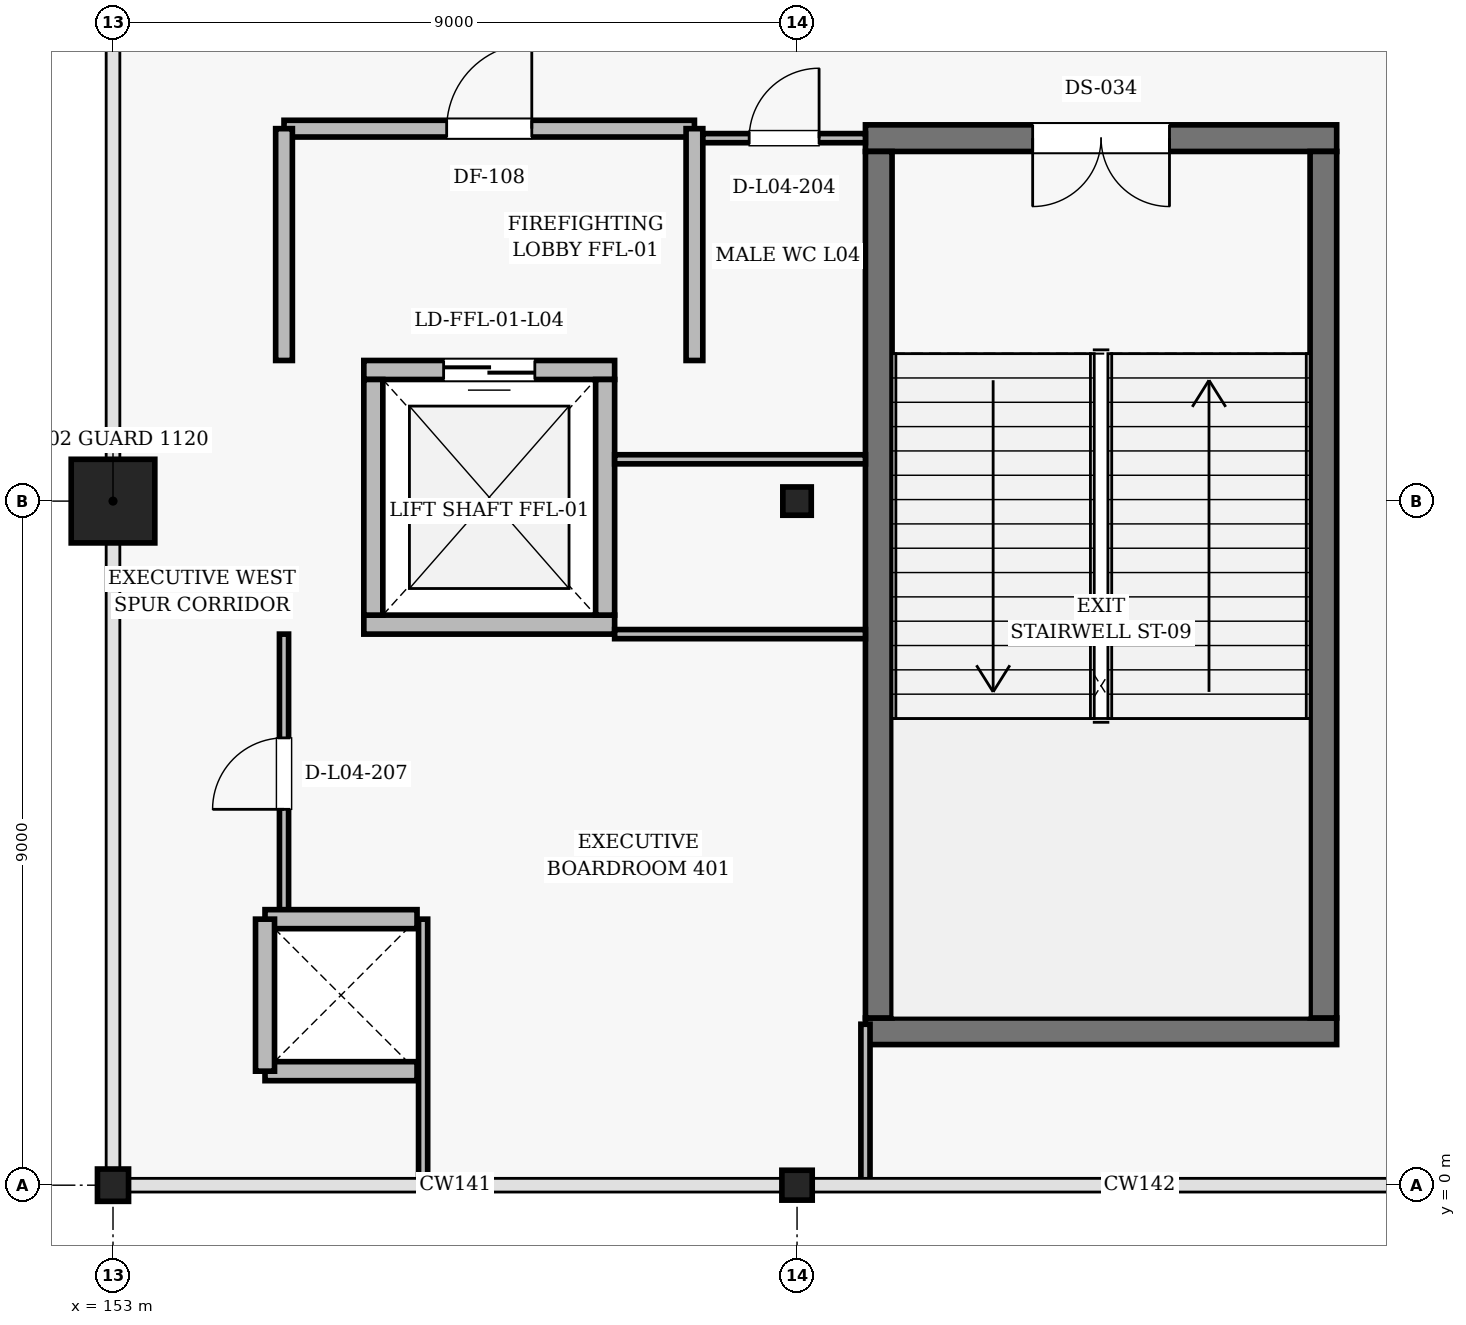
"""IFC4 building model, lengths in metres.
Left out: names, types, materials, properties, quantities, classifications, styles, units other than length and angle.
Written with IfcOpenShell. Run it as: python <this file> out.ifc"""

import sys

from ifc_helpers import new_model, si_unit, direction, frame, frame_2d, origin, origin_2d, place, context, subcontext, project, spatial, rectangle, i_section, extrude, element, fill, save


model = new_model("IFC4")
c1 = context("Model", 3, precision=1e-05, world=origin(), true_north=direction((0.0, 1.0)))
c2 = subcontext(c1, "Body", "Model", "MODEL_VIEW")
j1 = project(units=[si_unit("LENGTHUNIT", "METRE"), si_unit("PLANEANGLEUNIT", "RADIAN")], contexts=[c1])
p1 = place(None, origin())
s1 = spatial("IfcSite", under=j1, at=p1, CompositionType="ELEMENT")
p2 = place(p1, origin())
s2 = spatial("IfcBuilding", under=s1, at=p2, CompositionType="ELEMENT")
p3 = place(p2, frame((0.0, 0.0, 20.4)))
s3 = spatial("IfcBuildingStorey", under=s2, at=p3, CompositionType="ELEMENT", Elevation=20.4)
p4 = place(p3, frame((153.0, 0.0, 0.0), z_axis=(0.0, 0.0, 1.0), x_axis=(1.0, 0.0, 0.0)))
e1 = element("IfcColumn", 1, at=p4, inside=s3, PredefinedType="COLUMN", context=c2, shape_type="SweptSolid", body=[
    extrude(i_section(OverallWidth=0.409, OverallDepth=0.425, WebThickness=0.031, FlangeThickness=0.049, FilletRadius=0.02, at=origin_2d()), origin(), (0.0, 0.0, 1.0), 4.8),
])
p5 = place(p3, frame((153.0, 9.0, 0.0), z_axis=(0.0, 0.0, 1.0), x_axis=(1.0, 0.0, 0.0)))
e2 = element("IfcColumn", 2, at=p5, inside=s3, PredefinedType="COLUMN", context=c2, shape_type="SweptSolid", body=[
    extrude(rectangle(XDim=1.1, YDim=1.1, at=origin_2d()), origin(), (0.0, 0.0, 1.0), 4.8),
])
p6 = place(p3, frame((162.0, 0.0, 0.0), z_axis=(0.0, 0.0, 1.0), x_axis=(1.0, 0.0, 0.0)))
e3 = element("IfcColumn", 3, at=p6, inside=s3, PredefinedType="COLUMN", context=c2, shape_type="SweptSolid", body=[
    extrude(i_section(OverallWidth=0.399, OverallDepth=0.393, WebThickness=0.023, FlangeThickness=0.037, FilletRadius=0.018, at=origin_2d()), origin(), (0.0, 0.0, 1.0), 4.8),
])
p7 = place(p3, frame((162.0, 9.0, 0.0), z_axis=(0.0, 0.0, 1.0), x_axis=(1.0, 0.0, 0.0)))
e4 = element("IfcColumn", 4, at=p7, inside=s3, PredefinedType="COLUMN", context=c2, shape_type="SweptSolid", body=[
    extrude(i_section(OverallWidth=0.374, OverallDepth=0.372, WebThickness=0.016, FlangeThickness=0.026, FilletRadius=0.016, at=origin_2d()), origin(), (0.0, 0.0, 1.0), 4.8),
])
p8 = place(p3, frame((162.9, 2.025, 0.0), z_axis=(0.0, 0.0, 1.0), x_axis=(1.0, 0.0, 0.0)))
e5 = element("IfcWall", 5, at=p8, inside=s3, PredefinedType="SHEAR", context=c2, shape_type="SweptSolid", body=[
    extrude(rectangle(XDim=6.2, YDim=0.35, at=frame_2d((3.1, 0.0))), origin(), (0.0, 0.0, 1.0), 4.56),
])
p9 = place(p3, frame((169.1, 13.775, 0.0), z_axis=(0.0, 0.0, 1.0), x_axis=(-1.0, 0.0, 0.0)))
e6 = element("IfcWall", 6, at=p9, inside=s3, PredefinedType="SHEAR", context=c2, shape_type="SweptSolid", body=[
    extrude(rectangle(XDim=6.2, YDim=0.35, at=frame_2d((3.1, 0.0))), origin(), (0.0, 0.0, 1.0), 4.56),
])
p10 = place(p9, frame((2.2, 0.0, 0.0)))
e7 = element("IfcOpeningElement", 7, at=p10, cuts=e6, PredefinedType="OPENING", context=c2, shape_type="SweptSolid", body=[
    extrude(rectangle(XDim=1.8, YDim=2.2, at=frame_2d((0.9, 1.1))), frame((0.0, 0.185, 0.0), z_axis=(0.0, -1.0, 0.0), x_axis=(1.0, 0.0, 0.0)), (0.0, 0.0, 1.0), 0.37),
])
for number, where, z_axis, x_axis in (
    (8, (163.075, 13.6, 0.0), (0.0, 0.0, 1.0), (0.0, -1.0, 0.0)),
    (9, (168.925, 2.2, 0.0), (0.0, 0.0, 1.0), (0.0, 1.0, 0.0)),
):
    element("IfcWall", number, at=place(p3, frame(where, z_axis=z_axis, x_axis=x_axis)), inside=s3, PredefinedType="SHEAR", context=c2, shape_type="SweptSolid", body=[
        extrude(rectangle(XDim=11.4, YDim=0.35, at=frame_2d((5.7, 0.0))), origin(), (0.0, 0.0, 1.0), 4.56),
    ])
p11 = place(p3, frame((156.3, 7.375, 0.0), z_axis=(0.0, 0.0, 1.0), x_axis=(1.0, 0.0, 0.0)))
e10 = element("IfcWall", 10, at=p11, inside=s3, PredefinedType="SOLIDWALL", context=c2, shape_type="SweptSolid", body=[
    extrude(rectangle(XDim=3.3, YDim=0.25, at=frame_2d((1.65, 0.0))), origin(), (0.0, 0.0, 1.0), 4.56),
])
p12 = place(p3, frame((159.6, 10.725, 0.0), z_axis=(0.0, 0.0, 1.0), x_axis=(-1.0, 0.0, 0.0)))
e11 = element("IfcWall", 11, at=p12, inside=s3, PredefinedType="SOLIDWALL", context=c2, shape_type="SweptSolid", body=[
    extrude(rectangle(XDim=3.3, YDim=0.25, at=frame_2d((1.65, 0.0))), origin(), (0.0, 0.0, 1.0), 4.56),
])
p13 = place(p12, frame((1.05, 0.0, 0.0)))
e12 = element("IfcOpeningElement", 12, at=p13, cuts=e11, PredefinedType="OPENING", context=c2, shape_type="SweptSolid", body=[
    extrude(rectangle(XDim=1.2, YDim=2.25, at=frame_2d((0.6, 1.125))), frame((0.0, 0.135, 0.0), z_axis=(0.0, -1.0, 0.0), x_axis=(1.0, 0.0, 0.0)), (0.0, 0.0, 1.0), 0.27),
])
for number, where, z_axis, x_axis in (
    (13, (156.425, 10.6, 0.0), (0.0, 0.0, 1.0), (0.0, -1.0, 0.0)),
    (14, (159.475, 7.5, 0.0), (0.0, 0.0, 1.0), (0.0, 1.0, 0.0)),
):
    element("IfcWall", number, at=place(p3, frame(where, z_axis=z_axis, x_axis=x_axis)), inside=s3, PredefinedType="SOLIDWALL", context=c2, shape_type="SweptSolid", body=[
        extrude(rectangle(XDim=3.1, YDim=0.25, at=frame_2d((1.55, 0.0))), origin(), (0.0, 0.0, 1.0), 4.56),
    ])
p14 = place(p3, frame((155.25, 13.9, 0.0), z_axis=(0.0, 0.0, 1.0), x_axis=(1.0, 0.0, 0.0)))
e15 = element("IfcWall", 15, at=p14, inside=s3, PredefinedType="SOLIDWALL", context=c2, shape_type="SweptSolid", body=[
    extrude(rectangle(XDim=5.4, YDim=0.22, at=frame_2d((2.7, 0.0))), origin(), (0.0, 0.0, 1.0), 4.56),
])
p15 = place(p14, frame((2.14, 0.0, 0.0)))
e16 = element("IfcOpeningElement", 16, at=p15, cuts=e15, PredefinedType="OPENING", context=c2, shape_type="SweptSolid", body=[
    extrude(rectangle(XDim=1.12, YDim=2.2, at=frame_2d((0.56, 1.1))), frame((0.0, 0.12, 0.0), z_axis=(0.0, -1.0, 0.0), x_axis=(1.0, 0.0, 0.0)), (0.0, 0.0, 1.0), 0.24),
])
for number, where, z_axis, x_axis in (
    (17, (155.25, 10.85, 0.0), (0.0, 0.0, 1.0), (0.0, 1.0, 0.0)),
    (18, (160.65, 10.85, 0.0), (0.0, 0.0, 1.0), (0.0, 1.0, 0.0)),
):
    element("IfcWall", number, at=place(p3, frame(where, z_axis=z_axis, x_axis=x_axis)), inside=s3, PredefinedType="SOLIDWALL", context=c2, shape_type="SweptSolid", body=[
        extrude(rectangle(XDim=3.05, YDim=0.22, at=frame_2d((1.525, 0.0))), origin(), (0.0, 0.0, 1.0), 4.56),
    ])
p16 = place(p3, frame((160.76, 13.775, 0.0), z_axis=(0.0, 0.0, 1.0), x_axis=(1.0, 0.0, 0.0)))
e19 = element("IfcWall", 19, at=p16, inside=s3, PredefinedType="PARTITIONING", context=c2, shape_type="SweptSolid", body=[
    extrude(rectangle(XDim=2.14, YDim=0.12, at=frame_2d((1.07, 0.0))), origin(), (0.0, 0.0, 1.0), 3.772),
])
p17 = place(p16, frame((0.61, 0.0, 0.0)))
e20 = element("IfcOpeningElement", 20, at=p17, cuts=e19, PredefinedType="OPENING", context=c2, shape_type="SweptSolid", body=[
    extrude(rectangle(XDim=0.92, YDim=2.12, at=frame_2d((0.46, 1.06))), frame((0.0, 0.07, 0.0), z_axis=(0.0, -1.0, 0.0), x_axis=(1.0, 0.0, 0.0)), (0.0, 0.0, 1.0), 0.14),
])
p18 = place(p3, frame((162.9, 9.55, 0.0), z_axis=(0.0, 0.0, 1.0), x_axis=(-1.0, 0.0, 0.0)))
e21 = element("IfcWall", 21, at=p18, inside=s3, PredefinedType="PARTITIONING", context=c2, shape_type="SweptSolid", body=[
    extrude(rectangle(XDim=3.3, YDim=0.12, at=frame_2d((1.65, 0.0))), origin(), (0.0, 0.0, 1.0), 3.772),
])
p19 = place(p3, frame((159.6, 7.25, 0.0), z_axis=(0.0, 0.0, 1.0), x_axis=(1.0, 0.0, 0.0)))
e22 = element("IfcWall", 22, at=p19, inside=s3, PredefinedType="PARTITIONING", context=c2, shape_type="SweptSolid", body=[
    extrude(rectangle(XDim=3.3, YDim=0.12, at=frame_2d((1.65, 0.0))), origin(), (0.0, 0.0, 1.0), 3.934),
])
p20 = place(p3, frame((162.9, 2.117, 0.0), z_axis=(0.0, 0.0, 1.0), x_axis=(0.0, -1.0, 0.0)))
e23 = element("IfcWall", 23, at=p20, inside=s3, PredefinedType="PARTITIONING", context=c2, shape_type="SweptSolid", body=[
    extrude(rectangle(XDim=2.105, YDim=0.12, at=frame_2d((1.053, 0.0))), origin(), (0.0, 0.0, 1.0), 4.006),
])
p21 = place(p3, frame((157.08, 0.012, 0.0), z_axis=(0.0, 0.0, 1.0), x_axis=(0.0, 1.0, 0.0)))
e24 = element("IfcWall", 24, at=p21, inside=s3, PredefinedType="PARTITIONING", context=c2, shape_type="SweptSolid", body=[
    extrude(rectangle(XDim=3.488, YDim=0.12, at=frame_2d((1.744, 0.0))), origin(), (0.0, 0.0, 1.0), 4.245),
])
p22 = place(p3, frame((155.25, 3.58, 0.0), z_axis=(0.0, 0.0, 1.0), x_axis=(0.0, 1.0, 0.0)))
e25 = element("IfcWall", 25, at=p22, inside=s3, PredefinedType="PARTITIONING", context=c2, shape_type="SweptSolid", body=[
    extrude(rectangle(XDim=3.67, YDim=0.12, at=frame_2d((1.835, 0.0))), origin(), (0.0, 0.0, 1.0), 4.56),
])
p23 = place(p22, frame((1.365, 0.0, 0.0)))
e26 = element("IfcOpeningElement", 26, at=p23, cuts=e25, PredefinedType="OPENING", context=c2, shape_type="SweptSolid", body=[
    extrude(rectangle(XDim=0.94, YDim=2.15, at=frame_2d((0.47, 1.075))), frame((0.0, 0.07, 0.0), z_axis=(0.0, -1.0, 0.0), x_axis=(1.0, 0.0, 0.0)), (0.0, 0.0, 1.0), 0.14),
])
for number, where, z_axis, x_axis in (
    (27, (155.0, 1.5, 0.0), (0.0, 0.0, 1.0), (1.0, 0.0, 0.0)),
    (28, (157.0, 3.5, 0.0), (0.0, 0.0, 1.0), (-1.0, 0.0, 0.0)),
    (29, (155.0, 3.5, 0.0), (0.0, 0.0, 1.0), (0.0, -1.0, 0.0)),
):
    element("IfcWall", number, at=place(p3, frame(where, z_axis=z_axis, x_axis=x_axis)), inside=s3, PredefinedType="SOLIDWALL", context=c2, shape_type="SweptSolid", body=[
        extrude(rectangle(XDim=2.0, YDim=0.25, at=frame_2d((1.0, 0.0))), origin(), (0.0, 0.0, 1.0), 4.21),
    ])
p24 = place(p10, origin())
e30 = element("IfcDoor", 30, at=p24, inside=s3, OperationType="DOUBLE_DOOR_SINGLE_SWING", PredefinedType="DOOR", context=c2, shape_type="SweptSolid", body=[
    extrude(rectangle(XDim=1.8, YDim=2.2, at=frame_2d((0.9, 1.1))), frame((0.0, 0.025, 0.0), z_axis=(0.0, -1.0, 0.0), x_axis=(1.0, 0.0, 0.0)), (0.0, 0.0, 1.0), 0.05),
])
fill(e7, e30)
p25 = place(p13, origin())
e31 = element("IfcDoor", 31, at=p25, inside=s3, OperationType="DOUBLE_DOOR_SLIDING", PredefinedType="DOOR", context=c2, shape_type="SweptSolid", body=[
    extrude(rectangle(XDim=1.2, YDim=2.25, at=frame_2d((0.6, 1.125))), frame((0.0, 0.025, 0.0), z_axis=(0.0, -1.0, 0.0), x_axis=(1.0, 0.0, 0.0)), (0.0, 0.0, 1.0), 0.05),
])
fill(e12, e31)
p26 = place(p15, origin())
e32 = element("IfcDoor", 32, at=p26, inside=s3, OperationType="SINGLE_SWING_RIGHT", PredefinedType="DOOR", context=c2, shape_type="SweptSolid", body=[
    extrude(rectangle(XDim=1.12, YDim=2.2, at=frame_2d((0.56, 1.1))), frame((0.0, 0.025, 0.0), z_axis=(0.0, -1.0, 0.0), x_axis=(1.0, 0.0, 0.0)), (0.0, 0.0, 1.0), 0.05),
])
fill(e16, e32)
p27 = place(p17, origin())
e33 = element("IfcDoor", 33, at=p27, inside=s3, OperationType="SINGLE_SWING_RIGHT", PredefinedType="DOOR", context=c2, shape_type="SweptSolid", body=[
    extrude(rectangle(XDim=0.92, YDim=2.12, at=frame_2d((0.46, 1.06))), frame((0.0, 0.025, 0.0), z_axis=(0.0, -1.0, 0.0), x_axis=(1.0, 0.0, 0.0)), (0.0, 0.0, 1.0), 0.05),
])
fill(e20, e33)
p28 = place(p23, origin())
e34 = element("IfcDoor", 34, at=p28, inside=s3, OperationType="SINGLE_SWING_LEFT", PredefinedType="DOOR", context=c2, shape_type="SweptSolid", body=[
    extrude(rectangle(XDim=0.94, YDim=2.15, at=frame_2d((0.47, 1.075))), frame((0.0, 0.025, 0.0), z_axis=(0.0, -1.0, 0.0), x_axis=(1.0, 0.0, 0.0)), (0.0, 0.0, 1.0), 0.05),
])
fill(e26, e34)
save(model, sys.argv[1])
